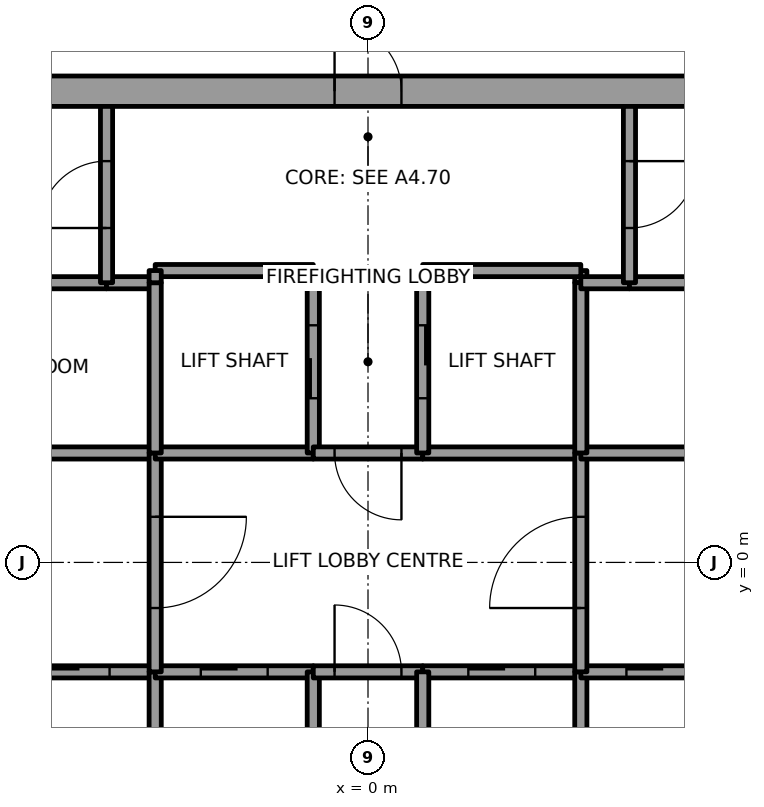
"""IFC4 building model, lengths in metres.
Left out: names, types, materials, properties, quantities, classifications, styles, units other than length and angle.
Written with IfcOpenShell. Run it as: python <this file> out.ifc"""

import sys

from ifc_helpers import new_model, si_unit, direction, frame, frame_2d, origin, place, context, subcontext, project, spatial, rectangle, extrude, element, fill, save


model = new_model("IFC4")
c1 = context("Model", 3, precision=1e-05, world=origin(), true_north=direction((0.0, 1.0)))
c2 = subcontext(c1, "Body", "Model", "MODEL_VIEW")
j1 = project(units=[si_unit("LENGTHUNIT", "METRE"), si_unit("PLANEANGLEUNIT", "RADIAN")], contexts=[c1])
p1 = place(None, origin())
s1 = spatial("IfcSite", under=j1, at=p1, CompositionType="ELEMENT")
p2 = place(p1, origin())
s2 = spatial("IfcBuilding", under=s1, at=p2, CompositionType="ELEMENT")
p3 = place(p2, frame((0.0, 0.0, 299.0)))
s3 = spatial("IfcBuildingStorey", under=s2, at=p3, CompositionType="ELEMENT", Elevation=299.0)
p4 = place(p3, frame((-11.0, 7.75, 0.0), z_axis=(0.0, 0.0, 1.0), x_axis=(1.0, 0.0, 0.0)))
e1 = element("IfcWall", 1, at=p4, inside=s3, PredefinedType="SHEAR", context=c2, shape_type="SweptSolid", body=[
    extrude(rectangle(XDim=22.0, YDim=0.5, at=frame_2d((11.0, 0.0))), origin(), (0.0, 0.0, 1.0), 4.0),
])
p5 = place(p4, frame((10.45, 0.0, 0.0)))
e2 = element("IfcOpeningElement", 2, at=p5, cuts=e1, PredefinedType="OPENING", context=c2, shape_type="SweptSolid", body=[
    extrude(rectangle(XDim=1.1, YDim=2.1, at=frame_2d((0.55, 1.05))), frame((0.0, 0.25, 0.0), z_axis=(0.0, -1.0, 0.0), x_axis=(1.0, 0.0, 0.0)), (0.0, 0.0, 1.0), 0.5),
])
p6 = place(p3, frame((-8.7, 1.8, 0.0), z_axis=(0.0, 0.0, 1.0), x_axis=(1.0, 0.0, 0.0)))
e3 = element("IfcWall", 3, at=p6, inside=s3, PredefinedType="SOLIDWALL", context=c2, shape_type="SweptSolid", body=[
    extrude(rectangle(XDim=5.2, YDim=0.2, at=frame_2d((2.6, 0.0))), origin(), (0.0, 0.0, 1.0), 3.85),
])
p7 = place(p6, frame((2.15, 0.0, 0.0)))
e4 = element("IfcOpeningElement", 4, at=p7, cuts=e3, PredefinedType="OPENING", context=c2, shape_type="SweptSolid", body=[
    extrude(rectangle(XDim=0.9, YDim=2.1, at=frame_2d((0.45, 1.05))), frame((0.0, 0.1, 0.0), z_axis=(0.0, -1.0, 0.0), x_axis=(1.0, 0.0, 0.0)), (0.0, 0.0, 1.0), 0.2),
])
p8 = place(p3, frame((-4.3, 4.6, 0.0), z_axis=(0.0, 0.0, 1.0), x_axis=(-1.0, 0.0, 0.0)))
e5 = element("IfcWall", 5, at=p8, inside=s3, PredefinedType="SOLIDWALL", context=c2, shape_type="SweptSolid", body=[
    extrude(rectangle(XDim=4.4, YDim=0.2, at=frame_2d((2.2, 0.0))), origin(), (0.0, 0.0, 1.0), 3.85),
])
p9 = place(p3, frame((-6.1, -1.8, 0.0), z_axis=(0.0, 0.0, 1.0), x_axis=(1.0, 0.0, 0.0)))
e6 = element("IfcWall", 6, at=p9, inside=s3, PredefinedType="SOLIDWALL", context=c2, shape_type="SweptSolid", body=[
    extrude(rectangle(XDim=2.6, YDim=0.2, at=frame_2d((1.3, 0.0))), origin(), (0.0, 0.0, 1.0), 3.85),
])
p10 = place(p9, frame((0.75, 0.0, 0.0)))
e7 = element("IfcOpeningElement", 7, at=p10, cuts=e6, PredefinedType="OPENING", context=c2, shape_type="SweptSolid", body=[
    extrude(rectangle(XDim=1.1, YDim=2.1, at=frame_2d((0.55, 1.05))), frame((0.0, 0.1, 0.0), z_axis=(0.0, -1.0, 0.0), x_axis=(1.0, 0.0, 0.0)), (0.0, 0.0, 1.0), 0.2),
])
p11 = place(p3, frame((-3.5, 4.6, 0.0), z_axis=(0.0, 0.0, 1.0), x_axis=(-1.0, 0.0, 0.0)))
e8 = element("IfcWall", 8, at=p11, inside=s3, PredefinedType="SOLIDWALL", context=c2, shape_type="SweptSolid", body=[
    extrude(rectangle(XDim=0.8, YDim=0.2, at=frame_2d((0.4, 0.0))), origin(), (0.0, 0.0, 1.0), 3.85),
])
p12 = place(p3, frame((-4.3, 4.6, 0.0), z_axis=(0.0, 0.0, 1.0), x_axis=(0.0, 1.0, 0.0)))
e9 = element("IfcWall", 9, at=p12, inside=s3, PredefinedType="SOLIDWALL", context=c2, shape_type="SweptSolid", body=[
    extrude(rectangle(XDim=2.9, YDim=0.2, at=frame_2d((1.45, 0.0))), origin(), (0.0, 0.0, 1.0), 3.85),
])
p13 = place(p12, frame((0.9, 0.0, 0.0)))
e10 = element("IfcOpeningElement", 10, at=p13, cuts=e9, PredefinedType="OPENING", context=c2, shape_type="SweptSolid", body=[
    extrude(rectangle(XDim=1.1, YDim=2.1, at=frame_2d((0.55, 1.05))), frame((0.0, 0.1, 0.0), z_axis=(0.0, -1.0, 0.0), x_axis=(1.0, 0.0, 0.0)), (0.0, 0.0, 1.0), 0.2),
])
p14 = place(p3, frame((-3.5, -4.6, 0.0), z_axis=(0.0, 0.0, 1.0), x_axis=(0.0, 1.0, 0.0)))
e11 = element("IfcWall", 11, at=p14, inside=s3, PredefinedType="SOLIDWALL", context=c2, shape_type="SweptSolid", body=[
    extrude(rectangle(XDim=2.8, YDim=0.2, at=frame_2d((1.4, 0.0))), origin(), (0.0, 0.0, 1.0), 3.85),
])
p15 = place(p3, frame((-3.5, -1.8, 0.0), z_axis=(0.0, 0.0, 1.0), x_axis=(1.0, 0.0, 0.0)))
e12 = element("IfcWall", 12, at=p15, inside=s3, PredefinedType="SOLIDWALL", context=c2, shape_type="SweptSolid", body=[
    extrude(rectangle(XDim=2.6, YDim=0.2, at=frame_2d((1.3, 0.0))), origin(), (0.0, 0.0, 1.0), 3.85),
])
p16 = place(p15, frame((0.75, 0.0, 0.0)))
e13 = element("IfcOpeningElement", 13, at=p16, cuts=e12, PredefinedType="OPENING", context=c2, shape_type="SweptSolid", body=[
    extrude(rectangle(XDim=1.1, YDim=2.1, at=frame_2d((0.55, 1.05))), frame((0.0, 0.1, 0.0), z_axis=(0.0, -1.0, 0.0), x_axis=(1.0, 0.0, 0.0)), (0.0, 0.0, 1.0), 0.2),
])
p17 = place(p3, frame((-3.5, 1.8, 0.0), z_axis=(0.0, 0.0, 1.0), x_axis=(0.0, -1.0, 0.0)))
e14 = element("IfcWall", 14, at=p17, inside=s3, PredefinedType="SOLIDWALL", context=c2, shape_type="SweptSolid", body=[
    extrude(rectangle(XDim=3.6, YDim=0.2, at=frame_2d((1.8, 0.0))), origin(), (0.0, 0.0, 1.0), 3.85),
])
p18 = place(p17, frame((1.05, 0.0, 0.0)))
e15 = element("IfcOpeningElement", 15, at=p18, cuts=e14, PredefinedType="OPENING", context=c2, shape_type="SweptSolid", body=[
    extrude(rectangle(XDim=1.5, YDim=2.1, at=frame_2d((0.75, 1.05))), frame((0.0, 0.1, 0.0), z_axis=(0.0, -1.0, 0.0), x_axis=(1.0, 0.0, 0.0)), (0.0, 0.0, 1.0), 0.2),
])
p19 = place(p3, frame((-0.9, 1.8, 0.0), z_axis=(0.0, 0.0, 1.0), x_axis=(-1.0, 0.0, 0.0)))
e16 = element("IfcWall", 16, at=p19, inside=s3, PredefinedType="SOLIDWALL", context=c2, shape_type="SweptSolid", body=[
    extrude(rectangle(XDim=2.6, YDim=0.2, at=frame_2d((1.3, 0.0))), origin(), (0.0, 0.0, 1.0), 3.85),
])
p20 = place(p3, frame((-3.5, 1.8, 0.0), z_axis=(0.0, 0.0, 1.0), x_axis=(0.0, 1.0, 0.0)))
e17 = element("IfcWall", 17, at=p20, inside=s3, PredefinedType="SOLIDWALL", context=c2, shape_type="SweptSolid", body=[
    extrude(rectangle(XDim=2.8, YDim=0.2, at=frame_2d((1.4, 0.0))), origin(), (0.0, 0.0, 1.0), 3.85),
])
p21 = place(p3, frame((-0.9, 1.8, 0.0), z_axis=(0.0, 0.0, 1.0), x_axis=(0.0, 1.0, 0.0)))
e18 = element("IfcWall", 18, at=p21, inside=s3, PredefinedType="SOLIDWALL", context=c2, shape_type="SweptSolid", body=[
    extrude(rectangle(XDim=3.0, YDim=0.2, at=frame_2d((1.5, 0.0))), origin(), (0.0, 0.0, 1.0), 3.85),
])
p22 = place(p21, frame((0.9, 0.0, 0.0)))
e19 = element("IfcOpeningElement", 19, at=p22, cuts=e18, PredefinedType="OPENING", context=c2, shape_type="SweptSolid", body=[
    extrude(rectangle(XDim=1.2, YDim=2.1, at=frame_2d((0.6, 1.05))), frame((0.0, 0.1, 0.0), z_axis=(0.0, -1.0, 0.0), x_axis=(1.0, 0.0, 0.0)), (0.0, 0.0, 1.0), 0.2),
])
p23 = place(p3, frame((-0.9, 4.8, 0.0), z_axis=(0.0, 0.0, 1.0), x_axis=(-1.0, 0.0, 0.0)))
e20 = element("IfcWall", 20, at=p23, inside=s3, PredefinedType="SOLIDWALL", context=c2, shape_type="SweptSolid", body=[
    extrude(rectangle(XDim=2.6, YDim=0.2, at=frame_2d((1.3, 0.0))), origin(), (0.0, 0.0, 1.0), 3.85),
])
p24 = place(p3, frame((-3.5, 4.8, 0.0), z_axis=(0.0, 0.0, 1.0), x_axis=(0.0, -1.0, 0.0)))
e21 = element("IfcWall", 21, at=p24, inside=s3, PredefinedType="SOLIDWALL", context=c2, shape_type="SweptSolid", body=[
    extrude(rectangle(XDim=0.2, YDim=0.2, at=frame_2d((0.1, 0.0))), origin(), (0.0, 0.0, 1.0), 3.85),
])
p25 = place(p3, frame((-0.9, -4.6, 0.0), z_axis=(0.0, 0.0, 1.0), x_axis=(0.0, 1.0, 0.0)))
e22 = element("IfcWall", 22, at=p25, inside=s3, PredefinedType="SOLIDWALL", context=c2, shape_type="SweptSolid", body=[
    extrude(rectangle(XDim=2.8, YDim=0.2, at=frame_2d((1.4, 0.0))), origin(), (0.0, 0.0, 1.0), 3.85),
])
p26 = place(p3, frame((-0.9, -1.8, 0.0), z_axis=(0.0, 0.0, 1.0), x_axis=(1.0, 0.0, 0.0)))
e23 = element("IfcWall", 23, at=p26, inside=s3, PredefinedType="SOLIDWALL", context=c2, shape_type="SweptSolid", body=[
    extrude(rectangle(XDim=1.8, YDim=0.2, at=frame_2d((0.9, 0.0))), origin(), (0.0, 0.0, 1.0), 3.85),
])
p27 = place(p26, frame((0.35, 0.0, 0.0)))
e24 = element("IfcOpeningElement", 24, at=p27, cuts=e23, PredefinedType="OPENING", context=c2, shape_type="SweptSolid", body=[
    extrude(rectangle(XDim=1.1, YDim=2.1, at=frame_2d((0.55, 1.05))), frame((0.0, 0.1, 0.0), z_axis=(0.0, -1.0, 0.0), x_axis=(1.0, 0.0, 0.0)), (0.0, 0.0, 1.0), 0.2),
])
p28 = place(p3, frame((0.9, 1.8, 0.0), z_axis=(0.0, 0.0, 1.0), x_axis=(-1.0, 0.0, 0.0)))
e25 = element("IfcWall", 25, at=p28, inside=s3, PredefinedType="SOLIDWALL", context=c2, shape_type="SweptSolid", body=[
    extrude(rectangle(XDim=1.8, YDim=0.2, at=frame_2d((0.9, 0.0))), origin(), (0.0, 0.0, 1.0), 3.85),
])
p29 = place(p28, frame((0.35, 0.0, 0.0)))
e26 = element("IfcOpeningElement", 26, at=p29, cuts=e25, PredefinedType="OPENING", context=c2, shape_type="SweptSolid", body=[
    extrude(rectangle(XDim=1.1, YDim=2.1, at=frame_2d((0.55, 1.05))), frame((0.0, 0.1, 0.0), z_axis=(0.0, -1.0, 0.0), x_axis=(1.0, 0.0, 0.0)), (0.0, 0.0, 1.0), 0.2),
])
p30 = place(p3, frame((0.9, -1.8, 0.0), z_axis=(0.0, 0.0, 1.0), x_axis=(1.0, 0.0, 0.0)))
e27 = element("IfcWall", 27, at=p30, inside=s3, PredefinedType="SOLIDWALL", context=c2, shape_type="SweptSolid", body=[
    extrude(rectangle(XDim=2.6, YDim=0.2, at=frame_2d((1.3, 0.0))), origin(), (0.0, 0.0, 1.0), 3.85),
])
p31 = place(p30, frame((0.75, 0.0, 0.0)))
e28 = element("IfcOpeningElement", 28, at=p31, cuts=e27, PredefinedType="OPENING", context=c2, shape_type="SweptSolid", body=[
    extrude(rectangle(XDim=1.1, YDim=2.1, at=frame_2d((0.55, 1.05))), frame((0.0, 0.1, 0.0), z_axis=(0.0, -1.0, 0.0), x_axis=(1.0, 0.0, 0.0)), (0.0, 0.0, 1.0), 0.2),
])
p32 = place(p3, frame((0.9, -1.8, 0.0), z_axis=(0.0, 0.0, 1.0), x_axis=(0.0, -1.0, 0.0)))
e29 = element("IfcWall", 29, at=p32, inside=s3, PredefinedType="SOLIDWALL", context=c2, shape_type="SweptSolid", body=[
    extrude(rectangle(XDim=2.8, YDim=0.2, at=frame_2d((1.4, 0.0))), origin(), (0.0, 0.0, 1.0), 3.85),
])
p33 = place(p3, frame((3.5, 1.8, 0.0), z_axis=(0.0, 0.0, 1.0), x_axis=(-1.0, 0.0, 0.0)))
e30 = element("IfcWall", 30, at=p33, inside=s3, PredefinedType="SOLIDWALL", context=c2, shape_type="SweptSolid", body=[
    extrude(rectangle(XDim=2.6, YDim=0.2, at=frame_2d((1.3, 0.0))), origin(), (0.0, 0.0, 1.0), 3.85),
])
p34 = place(p3, frame((3.5, 4.6, 0.0), z_axis=(0.0, 0.0, 1.0), x_axis=(0.0, 1.0, 0.0)))
e31 = element("IfcWall", 31, at=p34, inside=s3, PredefinedType="SOLIDWALL", context=c2, shape_type="SweptSolid", body=[
    extrude(rectangle(XDim=0.2, YDim=0.2, at=frame_2d((0.1, 0.0))), origin(), (0.0, 0.0, 1.0), 3.85),
])
p35 = place(p3, frame((3.5, 4.8, 0.0), z_axis=(0.0, 0.0, 1.0), x_axis=(-1.0, 0.0, 0.0)))
e32 = element("IfcWall", 32, at=p35, inside=s3, PredefinedType="SOLIDWALL", context=c2, shape_type="SweptSolid", body=[
    extrude(rectangle(XDim=2.6, YDim=0.2, at=frame_2d((1.3, 0.0))), origin(), (0.0, 0.0, 1.0), 3.85),
])
p36 = place(p3, frame((0.9, 4.8, 0.0), z_axis=(0.0, 0.0, 1.0), x_axis=(0.0, -1.0, 0.0)))
e33 = element("IfcWall", 33, at=p36, inside=s3, PredefinedType="SOLIDWALL", context=c2, shape_type="SweptSolid", body=[
    extrude(rectangle(XDim=3.0, YDim=0.2, at=frame_2d((1.5, 0.0))), origin(), (0.0, 0.0, 1.0), 3.85),
])
p37 = place(p36, frame((0.9, 0.0, 0.0)))
e34 = element("IfcOpeningElement", 34, at=p37, cuts=e33, PredefinedType="OPENING", context=c2, shape_type="SweptSolid", body=[
    extrude(rectangle(XDim=1.2, YDim=2.1, at=frame_2d((0.6, 1.05))), frame((0.0, 0.1, 0.0), z_axis=(0.0, -1.0, 0.0), x_axis=(1.0, 0.0, 0.0)), (0.0, 0.0, 1.0), 0.2),
])
p38 = place(p3, frame((3.5, -4.6, 0.0), z_axis=(0.0, 0.0, 1.0), x_axis=(0.0, 1.0, 0.0)))
e35 = element("IfcWall", 35, at=p38, inside=s3, PredefinedType="SOLIDWALL", context=c2, shape_type="SweptSolid", body=[
    extrude(rectangle(XDim=2.8, YDim=0.2, at=frame_2d((1.4, 0.0))), origin(), (0.0, 0.0, 1.0), 3.85),
])
p39 = place(p3, frame((3.5, -1.8, 0.0), z_axis=(0.0, 0.0, 1.0), x_axis=(1.0, 0.0, 0.0)))
e36 = element("IfcWall", 36, at=p39, inside=s3, PredefinedType="SOLIDWALL", context=c2, shape_type="SweptSolid", body=[
    extrude(rectangle(XDim=2.6, YDim=0.2, at=frame_2d((1.3, 0.0))), origin(), (0.0, 0.0, 1.0), 3.85),
])
p40 = place(p39, frame((0.75, 0.0, 0.0)))
e37 = element("IfcOpeningElement", 37, at=p40, cuts=e36, PredefinedType="OPENING", context=c2, shape_type="SweptSolid", body=[
    extrude(rectangle(XDim=1.1, YDim=2.1, at=frame_2d((0.55, 1.05))), frame((0.0, 0.1, 0.0), z_axis=(0.0, -1.0, 0.0), x_axis=(1.0, 0.0, 0.0)), (0.0, 0.0, 1.0), 0.2),
])
p41 = place(p3, frame((3.5, -1.8, 0.0), z_axis=(0.0, 0.0, 1.0), x_axis=(0.0, 1.0, 0.0)))
e38 = element("IfcWall", 38, at=p41, inside=s3, PredefinedType="SOLIDWALL", context=c2, shape_type="SweptSolid", body=[
    extrude(rectangle(XDim=3.6, YDim=0.2, at=frame_2d((1.8, 0.0))), origin(), (0.0, 0.0, 1.0), 3.85),
])
p42 = place(p41, frame((1.05, 0.0, 0.0)))
e39 = element("IfcOpeningElement", 39, at=p42, cuts=e38, PredefinedType="OPENING", context=c2, shape_type="SweptSolid", body=[
    extrude(rectangle(XDim=1.5, YDim=2.1, at=frame_2d((0.75, 1.05))), frame((0.0, 0.1, 0.0), z_axis=(0.0, -1.0, 0.0), x_axis=(1.0, 0.0, 0.0)), (0.0, 0.0, 1.0), 0.2),
])
p43 = place(p3, frame((3.5, 1.8, 0.0), z_axis=(0.0, 0.0, 1.0), x_axis=(1.0, 0.0, 0.0)))
e40 = element("IfcWall", 40, at=p43, inside=s3, PredefinedType="SOLIDWALL", context=c2, shape_type="SweptSolid", body=[
    extrude(rectangle(XDim=5.2, YDim=0.2, at=frame_2d((2.6, 0.0))), origin(), (0.0, 0.0, 1.0), 3.85),
])
p44 = place(p43, frame((2.15, 0.0, 0.0)))
e41 = element("IfcOpeningElement", 41, at=p44, cuts=e40, PredefinedType="OPENING", context=c2, shape_type="SweptSolid", body=[
    extrude(rectangle(XDim=0.9, YDim=2.1, at=frame_2d((0.45, 1.05))), frame((0.0, 0.1, 0.0), z_axis=(0.0, -1.0, 0.0), x_axis=(1.0, 0.0, 0.0)), (0.0, 0.0, 1.0), 0.2),
])
p45 = place(p3, frame((3.5, 4.6, 0.0), z_axis=(0.0, 0.0, 1.0), x_axis=(0.0, -1.0, 0.0)))
e42 = element("IfcWall", 42, at=p45, inside=s3, PredefinedType="SOLIDWALL", context=c2, shape_type="SweptSolid", body=[
    extrude(rectangle(XDim=2.8, YDim=0.2, at=frame_2d((1.4, 0.0))), origin(), (0.0, 0.0, 1.0), 3.85),
])
p46 = place(p3, frame((4.3, 4.6, 0.0), z_axis=(0.0, 0.0, 1.0), x_axis=(-1.0, 0.0, 0.0)))
e43 = element("IfcWall", 43, at=p46, inside=s3, PredefinedType="SOLIDWALL", context=c2, shape_type="SweptSolid", body=[
    extrude(rectangle(XDim=0.8, YDim=0.2, at=frame_2d((0.4, 0.0))), origin(), (0.0, 0.0, 1.0), 3.85),
])
p47 = place(p3, frame((8.7, 4.6, 0.0), z_axis=(0.0, 0.0, 1.0), x_axis=(-1.0, 0.0, 0.0)))
e44 = element("IfcWall", 44, at=p47, inside=s3, PredefinedType="SOLIDWALL", context=c2, shape_type="SweptSolid", body=[
    extrude(rectangle(XDim=4.4, YDim=0.2, at=frame_2d((2.2, 0.0))), origin(), (0.0, 0.0, 1.0), 3.85),
])
p48 = place(p3, frame((4.3, 7.5, 0.0), z_axis=(0.0, 0.0, 1.0), x_axis=(0.0, -1.0, 0.0)))
e45 = element("IfcWall", 45, at=p48, inside=s3, PredefinedType="SOLIDWALL", context=c2, shape_type="SweptSolid", body=[
    extrude(rectangle(XDim=2.9, YDim=0.2, at=frame_2d((1.45, 0.0))), origin(), (0.0, 0.0, 1.0), 3.85),
])
p49 = place(p48, frame((0.9, 0.0, 0.0)))
e46 = element("IfcOpeningElement", 46, at=p49, cuts=e45, PredefinedType="OPENING", context=c2, shape_type="SweptSolid", body=[
    extrude(rectangle(XDim=1.1, YDim=2.1, at=frame_2d((0.55, 1.05))), frame((0.0, 0.1, 0.0), z_axis=(0.0, -1.0, 0.0), x_axis=(1.0, 0.0, 0.0)), (0.0, 0.0, 1.0), 0.2),
])
p50 = place(p10, origin())
e47 = element("IfcDoor", 47, at=p50, inside=s3, OperationType="SLIDING_TO_RIGHT", PredefinedType="DOOR", context=c2, shape_type="SweptSolid", body=[
    extrude(rectangle(XDim=1.1, YDim=2.1, at=frame_2d((0.55, 1.05))), frame((0.0, 0.025, 0.0), z_axis=(0.0, -1.0, 0.0), x_axis=(1.0, 0.0, 0.0)), (0.0, 0.0, 1.0), 0.05),
])
fill(e7, e47)
p51 = place(p16, origin())
e48 = element("IfcDoor", 48, at=p51, inside=s3, OperationType="SLIDING_TO_LEFT", PredefinedType="DOOR", context=c2, shape_type="SweptSolid", body=[
    extrude(rectangle(XDim=1.1, YDim=2.1, at=frame_2d((0.55, 1.05))), frame((0.0, 0.025, 0.0), z_axis=(0.0, -1.0, 0.0), x_axis=(1.0, 0.0, 0.0)), (0.0, 0.0, 1.0), 0.05),
])
fill(e13, e48)
p52 = place(p31, origin())
e49 = element("IfcDoor", 49, at=p52, inside=s3, OperationType="SLIDING_TO_LEFT", PredefinedType="DOOR", context=c2, shape_type="SweptSolid", body=[
    extrude(rectangle(XDim=1.1, YDim=2.1, at=frame_2d((0.55, 1.05))), frame((0.0, 0.025, 0.0), z_axis=(0.0, -1.0, 0.0), x_axis=(1.0, 0.0, 0.0)), (0.0, 0.0, 1.0), 0.05),
])
fill(e28, e49)
p53 = place(p40, origin())
e50 = element("IfcDoor", 50, at=p53, inside=s3, OperationType="SLIDING_TO_LEFT", PredefinedType="DOOR", context=c2, shape_type="SweptSolid", body=[
    extrude(rectangle(XDim=1.1, YDim=2.1, at=frame_2d((0.55, 1.05))), frame((0.0, 0.025, 0.0), z_axis=(0.0, -1.0, 0.0), x_axis=(1.0, 0.0, 0.0)), (0.0, 0.0, 1.0), 0.05),
])
fill(e37, e50)
p54 = place(p22, origin())
e51 = element("IfcDoor", 51, at=p54, inside=s3, OperationType="SLIDING_TO_LEFT", PredefinedType="DOOR", context=c2, shape_type="SweptSolid", body=[
    extrude(rectangle(XDim=1.2, YDim=2.1, at=frame_2d((0.6, 1.05))), frame((0.0, 0.025, 0.0), z_axis=(0.0, -1.0, 0.0), x_axis=(1.0, 0.0, 0.0)), (0.0, 0.0, 1.0), 0.05),
])
fill(e19, e51)
p55 = place(p37, origin())
e52 = element("IfcDoor", 52, at=p55, inside=s3, OperationType="SLIDING_TO_RIGHT", PredefinedType="DOOR", context=c2, shape_type="SweptSolid", body=[
    extrude(rectangle(XDim=1.2, YDim=2.1, at=frame_2d((0.6, 1.05))), frame((0.0, 0.025, 0.0), z_axis=(0.0, -1.0, 0.0), x_axis=(1.0, 0.0, 0.0)), (0.0, 0.0, 1.0), 0.05),
])
fill(e34, e52)
p56 = place(p18, origin())
e53 = element("IfcDoor", 53, at=p56, inside=s3, OperationType="DOUBLE_DOOR_SINGLE_SWING", PredefinedType="DOOR", context=c2, shape_type="SweptSolid", body=[
    extrude(rectangle(XDim=1.5, YDim=2.1, at=frame_2d((0.75, 1.05))), frame((0.0, 0.025, 0.0), z_axis=(0.0, -1.0, 0.0), x_axis=(1.0, 0.0, 0.0)), (0.0, 0.0, 1.0), 0.05),
])
fill(e15, e53)
p57 = place(p42, origin())
e54 = element("IfcDoor", 54, at=p57, inside=s3, OperationType="DOUBLE_DOOR_SINGLE_SWING", PredefinedType="DOOR", context=c2, shape_type="SweptSolid", body=[
    extrude(rectangle(XDim=1.5, YDim=2.1, at=frame_2d((0.75, 1.05))), frame((0.0, 0.025, 0.0), z_axis=(0.0, -1.0, 0.0), x_axis=(1.0, 0.0, 0.0)), (0.0, 0.0, 1.0), 0.05),
])
fill(e39, e54)
p58 = place(p29, origin())
e55 = element("IfcDoor", 55, at=p58, inside=s3, OperationType="SINGLE_SWING_RIGHT", PredefinedType="DOOR", context=c2, shape_type="SweptSolid", body=[
    extrude(rectangle(XDim=1.1, YDim=2.1, at=frame_2d((0.55, 1.05))), frame((0.0, 0.025, 0.0), z_axis=(0.0, -1.0, 0.0), x_axis=(1.0, 0.0, 0.0)), (0.0, 0.0, 1.0), 0.05),
])
fill(e26, e55)
p59 = place(p27, origin())
e56 = element("IfcDoor", 56, at=p59, inside=s3, OperationType="SINGLE_SWING_LEFT", PredefinedType="DOOR", context=c2, shape_type="SweptSolid", body=[
    extrude(rectangle(XDim=1.1, YDim=2.1, at=frame_2d((0.55, 1.05))), frame((0.0, 0.025, 0.0), z_axis=(0.0, -1.0, 0.0), x_axis=(1.0, 0.0, 0.0)), (0.0, 0.0, 1.0), 0.05),
])
fill(e24, e56)
p60 = place(p13, origin())
e57 = element("IfcDoor", 57, at=p60, inside=s3, OperationType="SINGLE_SWING_LEFT", PredefinedType="DOOR", context=c2, shape_type="SweptSolid", body=[
    extrude(rectangle(XDim=1.1, YDim=2.1, at=frame_2d((0.55, 1.05))), frame((0.0, 0.025, 0.0), z_axis=(0.0, -1.0, 0.0), x_axis=(1.0, 0.0, 0.0)), (0.0, 0.0, 1.0), 0.05),
])
fill(e10, e57)
p61 = place(p49, origin())
e58 = element("IfcDoor", 58, at=p61, inside=s3, OperationType="SINGLE_SWING_RIGHT", PredefinedType="DOOR", context=c2, shape_type="SweptSolid", body=[
    extrude(rectangle(XDim=1.1, YDim=2.1, at=frame_2d((0.55, 1.05))), frame((0.0, 0.025, 0.0), z_axis=(0.0, -1.0, 0.0), x_axis=(1.0, 0.0, 0.0)), (0.0, 0.0, 1.0), 0.05),
])
fill(e46, e58)
p62 = place(p5, origin())
e59 = element("IfcDoor", 59, at=p62, inside=s3, OperationType="SINGLE_SWING_LEFT", PredefinedType="DOOR", context=c2, shape_type="SweptSolid", body=[
    extrude(rectangle(XDim=1.1, YDim=2.1, at=frame_2d((0.55, 1.05))), frame((0.0, 0.025, 0.0), z_axis=(0.0, -1.0, 0.0), x_axis=(1.0, 0.0, 0.0)), (0.0, 0.0, 1.0), 0.05),
])
fill(e2, e59)
save(model, sys.argv[1])
